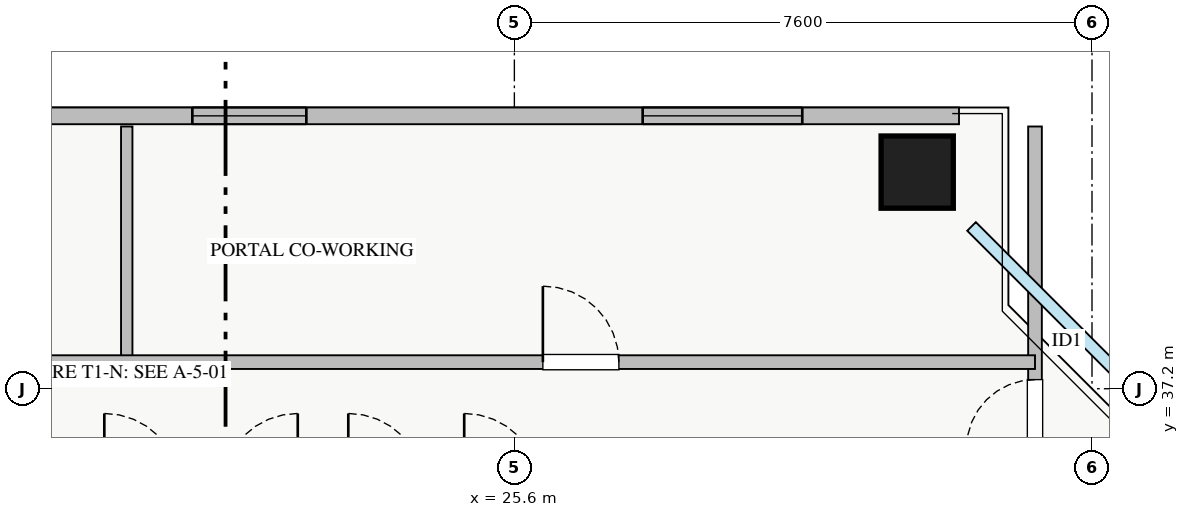
"""IFC4 building model, lengths in metres.
Left out: names, types, materials, properties, quantities, classifications, styles, units other than length and angle.
Written with IfcOpenShell. Run it as: python <this file> out.ifc"""

import sys

from ifc_helpers import new_model, si_unit, direction, frame, frame_2d, origin, origin_2d, place, context, subcontext, project, spatial, rectangle, extrude, source, transform, mapped, element, fill, save


model = new_model("IFC4")
c1 = context("Model", 3, precision=1e-05, world=origin(), true_north=direction((0.0, 1.0)))
c2 = subcontext(c1, "Body", "Model", "MODEL_VIEW")
j1 = project(units=[si_unit("LENGTHUNIT", "METRE"), si_unit("PLANEANGLEUNIT", "RADIAN")], contexts=[c1])
p1 = place(None, origin())
s1 = spatial("IfcSite", under=j1, at=p1, CompositionType="ELEMENT")
p2 = place(p1, origin())
s2 = spatial("IfcBuilding", under=s1, at=p2, CompositionType="ELEMENT")
p3 = place(p2, frame((0.0, 0.0, 153.5)))
s3 = spatial("IfcBuildingStorey", under=s2, at=p3, CompositionType="ELEMENT", Elevation=153.5)
m1 = source(origin(), c2, "Body", "SweptSolid", [
    extrude(rectangle(XDim=0.95, YDim=0.95, at=origin_2d()), origin(), (0.0, 0.0, 1.0), 3.25),
])
p4 = place(p3, frame((30.9, 40.05, 0.0), z_axis=(0.0, 0.0, 1.0), x_axis=(1.0, 0.0, 0.0)))
e1 = element("IfcColumn", 1, at=p4, inside=s3, PredefinedType="COLUMN", context=c2, shape_type="MappedRepresentation", body=[
    mapped(m1, transform((0.0, 0.0, 0.0), x_axis=(1.0, 0.0, 0.0), y_axis=(0.0, 1.0, 0.0), z_axis=(0.0, 0.0, 1.0), scale=1.0)),
])
p5 = place(p3, frame((6.55, 40.79, 0.0), z_axis=(0.0, 0.0, 1.0), x_axis=(1.0, 0.0, 0.0)))
e2 = element("IfcWall", 2, at=p5, inside=s3, PredefinedType="STANDARD", context=c2, shape_type="SweptSolid", body=[
    extrude(rectangle(XDim=24.9, YDim=0.22, at=frame_2d((12.45, 0.0))), origin(), (0.0, 0.0, 1.0), 2.61),
])
p6 = place(p5, frame((0.3, 0.0, 0.9)))
e3 = element("IfcOpeningElement", 3, at=p6, cuts=e2, PredefinedType="OPENING", context=c2, shape_type="SweptSolid", body=[
    extrude(rectangle(XDim=1.5, YDim=1.5, at=frame_2d((0.75, 0.75))), frame((0.0, 0.12, 0.0), z_axis=(0.0, -1.0, 0.0), x_axis=(1.0, 0.0, 0.0)), (0.0, 0.0, 1.0), 0.24),
])
p7 = place(p5, frame((8.438, 0.0, 0.9)))
e4 = element("IfcOpeningElement", 4, at=p7, cuts=e2, PredefinedType="OPENING", context=c2, shape_type="SweptSolid", body=[
    extrude(rectangle(XDim=1.8, YDim=1.45, at=frame_2d((0.9, 0.725))), frame((0.0, 0.12, 0.0), z_axis=(0.0, -1.0, 0.0), x_axis=(1.0, 0.0, 0.0)), (0.0, 0.0, 1.0), 0.24),
])
p8 = place(p5, frame((14.813, 0.0, 0.9)))
e5 = element("IfcOpeningElement", 5, at=p8, cuts=e2, PredefinedType="OPENING", context=c2, shape_type="SweptSolid", body=[
    extrude(rectangle(XDim=1.5, YDim=1.45, at=frame_2d((0.75, 0.725))), frame((0.0, 0.12, 0.0), z_axis=(0.0, -1.0, 0.0), x_axis=(1.0, 0.0, 0.0)), (0.0, 0.0, 1.0), 0.24),
])
p9 = place(p5, frame((20.738, 0.0, 0.9)))
e6 = element("IfcOpeningElement", 6, at=p9, cuts=e2, PredefinedType="OPENING", context=c2, shape_type="SweptSolid", body=[
    extrude(rectangle(XDim=2.1, YDim=1.48, at=frame_2d((1.05, 0.74))), frame((0.0, 0.12, 0.0), z_axis=(0.0, -1.0, 0.0), x_axis=(1.0, 0.0, 0.0)), (0.0, 0.0, 1.0), 0.24),
])
p10 = place(p5, frame((4.094, 0.0, 0.9)))
e7 = element("IfcOpeningElement", 7, at=p10, cuts=e2, PredefinedType="OPENING", context=c2, shape_type="SweptSolid", body=[
    extrude(rectangle(XDim=2.4, YDim=1.5, at=frame_2d((1.2, 0.75))), frame((0.0, 0.12, 0.0), z_axis=(0.0, -1.0, 0.0), x_axis=(1.0, 0.0, 0.0)), (0.0, 0.0, 1.0), 0.24),
])
p11 = place(p3, frame((32.45, 29.3, 0.0), z_axis=(0.0, 0.0, 1.0), x_axis=(0.0, 1.0, 0.0)))
e8 = element("IfcWall", 8, at=p11, inside=s3, PredefinedType="PARTITIONING", context=c2, shape_type="SweptSolid", body=[
    extrude(rectangle(XDim=11.35, YDim=0.18, at=frame_2d((5.675, 0.0))), origin(), (0.0, 0.0, 1.0), 3.07),
])
p12 = place(p11, frame((1.115, 0.0, 0.0)))
e9 = element("IfcOpeningElement", 9, at=p12, cuts=e8, PredefinedType="OPENING", context=c2, shape_type="SweptSolid", body=[
    extrude(rectangle(XDim=1.0, YDim=2.05, at=frame_2d((0.5, 1.025))), frame((0.0, 0.1, 0.0), z_axis=(0.0, -1.0, 0.0), x_axis=(1.0, 0.0, 0.0)), (0.0, 0.0, 1.0), 0.2),
])
p13 = place(p11, frame((7.12, 0.0, 0.0)))
e10 = element("IfcOpeningElement", 10, at=p13, cuts=e8, PredefinedType="OPENING", context=c2, shape_type="SweptSolid", body=[
    extrude(rectangle(XDim=0.9, YDim=2.05, at=frame_2d((0.45, 1.025))), frame((0.0, 0.1, 0.0), z_axis=(0.0, -1.0, 0.0), x_axis=(1.0, 0.0, 0.0)), (0.0, 0.0, 1.0), 0.2),
])
p14 = place(p3, frame((20.5, 37.55, 0.0), z_axis=(0.0, 0.0, 1.0), x_axis=(0.0, 1.0, 0.0)))
e11 = element("IfcWall", 11, at=p14, inside=s3, PredefinedType="PARTITIONING", context=c2, shape_type="SweptSolid", body=[
    extrude(rectangle(XDim=3.1, YDim=0.15, at=frame_2d((1.55, 0.0))), origin(), (0.0, 0.0, 1.0), 3.07),
])
p15 = place(p3, frame((8.65, 37.55, 0.0), z_axis=(0.0, 0.0, 1.0), x_axis=(1.0, 0.0, 0.0)))
e12 = element("IfcWall", 12, at=p15, inside=s3, PredefinedType="PARTITIONING", context=c2, shape_type="SweptSolid", body=[
    extrude(rectangle(XDim=23.8, YDim=0.18, at=frame_2d((11.9, 0.0))), origin(), (0.0, 0.0, 1.0), 3.07),
])
p16 = place(p15, frame((5.425, 0.0, 0.0)))
e13 = element("IfcOpeningElement", 13, at=p16, cuts=e12, PredefinedType="OPENING", context=c2, shape_type="SweptSolid", body=[
    extrude(rectangle(XDim=1.0, YDim=2.05, at=frame_2d((0.5, 1.025))), frame((0.0, 0.1, 0.0), z_axis=(0.0, -1.0, 0.0), x_axis=(1.0, 0.0, 0.0)), (0.0, 0.0, 1.0), 0.2),
])
p17 = place(p15, frame((17.325, 0.0, 0.0)))
e14 = element("IfcOpeningElement", 14, at=p17, cuts=e12, PredefinedType="OPENING", context=c2, shape_type="SweptSolid", body=[
    extrude(rectangle(XDim=1.0, YDim=2.05, at=frame_2d((0.5, 1.025))), frame((0.0, 0.1, 0.0), z_axis=(0.0, -1.0, 0.0), x_axis=(1.0, 0.0, 0.0)), (0.0, 0.0, 1.0), 0.2),
])
m2 = source(origin(), c2, "Body", "SweptSolid", [
    extrude(rectangle(XDim=1.5, YDim=1.45, at=frame_2d((0.75, 0.725))), frame((0.0, 0.03, 0.0), z_axis=(0.0, -1.0, 0.0), x_axis=(1.0, 0.0, 0.0)), (0.0, 0.0, 1.0), 0.06),
])
p18 = place(p8, origin())
e15 = element("IfcWindow", 15, at=p18, inside=s3, PartitioningType="DOUBLE_PANEL_VERTICAL", PredefinedType="WINDOW", context=c2, shape_type="MappedRepresentation", body=[
    mapped(m2, transform((0.0, 0.0, 0.0), x_axis=(1.0, 0.0, 0.0), y_axis=(0.0, 1.0, 0.0), z_axis=(0.0, 0.0, 1.0), scale=1.0)),
])
fill(e5, e15)
m3 = source(origin(), c2, "Body", "SweptSolid", [
    extrude(rectangle(XDim=2.1, YDim=1.48, at=frame_2d((1.05, 0.74))), frame((0.0, 0.03, 0.0), z_axis=(0.0, -1.0, 0.0), x_axis=(1.0, 0.0, 0.0)), (0.0, 0.0, 1.0), 0.06),
])
p19 = place(p9, origin())
e16 = element("IfcWindow", 16, at=p19, inside=s3, PartitioningType="TRIPLE_PANEL_VERTICAL", PredefinedType="WINDOW", context=c2, shape_type="MappedRepresentation", body=[
    mapped(m3, transform((0.0, 0.0, 0.0), x_axis=(1.0, 0.0, 0.0), y_axis=(0.0, 1.0, 0.0), z_axis=(0.0, 0.0, 1.0), scale=1.0)),
])
fill(e6, e16)
m4 = source(origin(), c2, "Body", "SweptSolid", [
    extrude(rectangle(XDim=0.9, YDim=2.05, at=frame_2d((0.45, 1.025))), frame((0.0, 0.025, 0.0), z_axis=(0.0, -1.0, 0.0), x_axis=(1.0, 0.0, 0.0)), (0.0, 0.0, 1.0), 0.05),
])
p20 = place(p13, origin())
e17 = element("IfcDoor", 17, at=p20, inside=s3, OperationType="SINGLE_SWING_LEFT", PredefinedType="DOOR", context=c2, shape_type="MappedRepresentation", body=[
    mapped(m4, transform((0.0, 0.0, 0.0), x_axis=(1.0, 0.0, 0.0), y_axis=(0.0, 1.0, 0.0), z_axis=(0.0, 0.0, 1.0), scale=1.0)),
])
fill(e10, e17)
m5 = source(origin(), c2, "Body", "SweptSolid", [
    extrude(rectangle(XDim=1.0, YDim=2.05, at=frame_2d((0.5, 1.025))), frame((0.0, 0.025, 0.0), z_axis=(0.0, -1.0, 0.0), x_axis=(1.0, 0.0, 0.0)), (0.0, 0.0, 1.0), 0.05),
])
p21 = place(p17, origin())
e18 = element("IfcDoor", 18, at=p21, inside=s3, OperationType="SINGLE_SWING_LEFT", PredefinedType="DOOR", context=c2, shape_type="MappedRepresentation", body=[
    mapped(m5, transform((0.0, 0.0, 0.0), x_axis=(1.0, 0.0, 0.0), y_axis=(0.0, 1.0, 0.0), z_axis=(0.0, 0.0, 1.0), scale=1.0)),
])
fill(e14, e18)
save(model, sys.argv[1])
